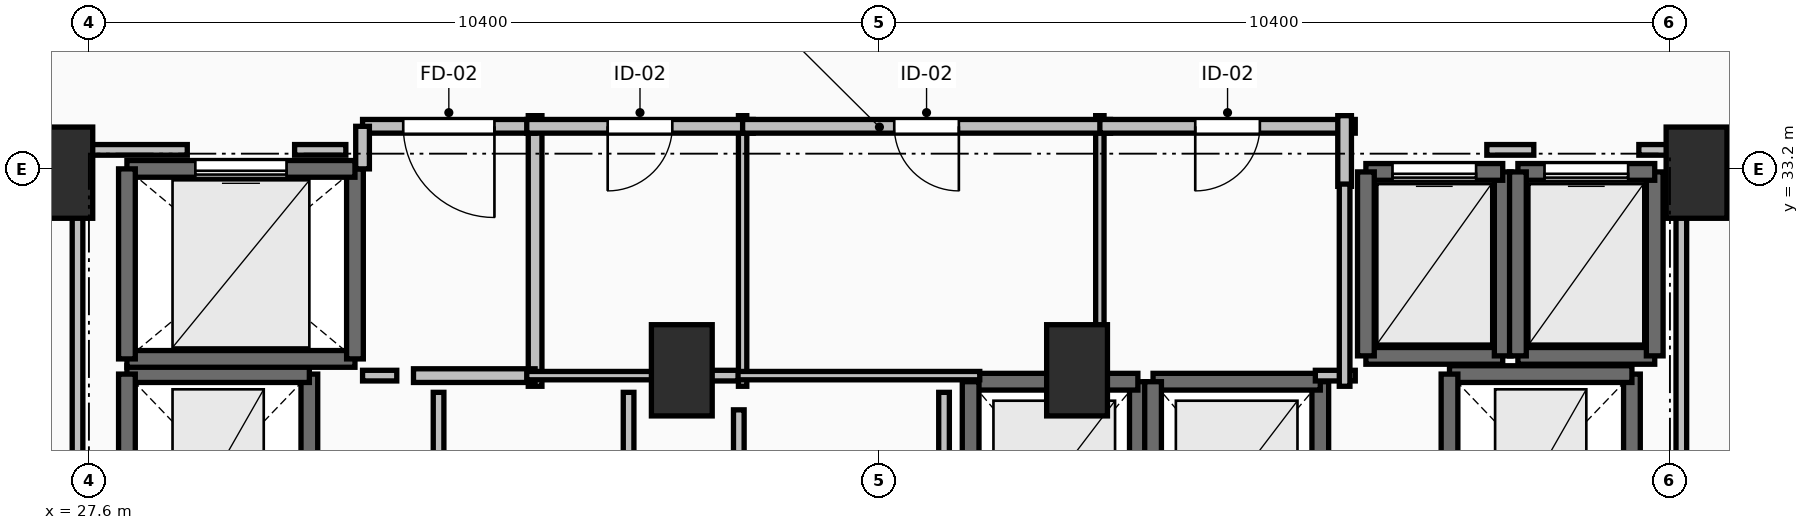
"""IFC4 building model, lengths in metres.
Left out: names, types, materials, properties, quantities, classifications, styles, units other than length and angle.
Written with IfcOpenShell. Run it as: python <this file> out.ifc"""

import sys

from ifc_helpers import new_model, si_unit, direction, frame, frame_2d, origin, origin_2d, place, context, subcontext, project, spatial, rectangle, extrude, element, fill, save


model = new_model("IFC4")
c1 = context("Model", 3, precision=1e-05, world=origin(), true_north=direction((0.0, 1.0)))
c2 = subcontext(c1, "Body", "Model", "MODEL_VIEW")
j1 = project(units=[si_unit("LENGTHUNIT", "METRE"), si_unit("PLANEANGLEUNIT", "RADIAN")], contexts=[c1])
p1 = place(None, origin())
s1 = spatial("IfcSite", under=j1, at=p1, CompositionType="ELEMENT")
p2 = place(p1, origin())
s2 = spatial("IfcBuilding", under=s1, at=p2, CompositionType="ELEMENT")
p3 = place(p2, frame((0.0, 0.0, 174.6)))
s3 = spatial("IfcBuildingStorey", under=s2, at=p3, CompositionType="ELEMENT", Elevation=174.6)
for number, where, z_axis, x_axis in (
    (1, (27.25, 33.15, 0.0), (0.0, 0.0, 1.0), (1.0, 0.0, 0.0)),
    (2, (48.75, 33.15, 0.0), (0.0, 0.0, 1.0), (1.0, 0.0, 0.0)),
    (3, (35.4, 30.55, 0.0), (0.0, 0.0, 1.0), (1.0, 0.0, 0.0)),
    (4, (40.6, 30.55, 0.0), (0.0, 0.0, 1.0), (1.0, 0.0, 0.0)),
):
    element("IfcColumn", number, at=place(p3, frame(where, z_axis=z_axis, x_axis=x_axis)), inside=s3, PredefinedType="PILASTER", context=c2, shape_type="SweptSolid", body=[
        extrude(rectangle(XDim=0.8, YDim=1.2, at=origin_2d()), origin(), (0.0, 0.0, 1.0), 4.5),
    ])
p4 = place(p3, frame((41.4, 27.8, 0.0), z_axis=(0.0, 0.0, 1.0), x_axis=(0.0, 1.0, 0.0)))
e5 = element("IfcWall", 5, at=p4, inside=s3, PredefinedType="SOLIDWALL", context=c2, shape_type="SweptSolid", body=[
    extrude(rectangle(XDim=2.6, YDim=0.22, at=frame_2d((1.3, 0.0))), origin(), (0.0, 0.0, 1.0), 4.24),
])
p5 = place(p3, frame((41.4, 30.4, 0.0), z_axis=(0.0, 0.0, 1.0), x_axis=(-1.0, 0.0, 0.0)))
e6 = element("IfcWall", 6, at=p5, inside=s3, PredefinedType="SOLIDWALL", context=c2, shape_type="SweptSolid", body=[
    extrude(rectangle(XDim=2.2, YDim=0.22, at=frame_2d((1.1, 0.0))), origin(), (0.0, 0.0, 1.0), 4.24),
])
for number, where, z_axis, x_axis in (
    (7, (39.2, 30.4, 0.0), (0.0, 0.0, 1.0), (0.0, -1.0, 0.0)),
    (8, (43.8, 27.8, 0.0), (0.0, 0.0, 1.0), (0.0, 1.0, 0.0)),
):
    element("IfcWall", number, at=place(p3, frame(where, z_axis=z_axis, x_axis=x_axis)), inside=s3, PredefinedType="SOLIDWALL", context=c2, shape_type="SweptSolid", body=[
        extrude(rectangle(XDim=2.6, YDim=0.22, at=frame_2d((1.3, 0.0))), origin(), (0.0, 0.0, 1.0), 4.24),
    ])
p6 = place(p3, frame((43.8, 30.4, 0.0), z_axis=(0.0, 0.0, 1.0), x_axis=(-1.0, 0.0, 0.0)))
e9 = element("IfcWall", 9, at=p6, inside=s3, PredefinedType="SOLIDWALL", context=c2, shape_type="SweptSolid", body=[
    extrude(rectangle(XDim=2.2, YDim=0.22, at=frame_2d((1.1, 0.0))), origin(), (0.0, 0.0, 1.0), 4.24),
])
p7 = place(p3, frame((41.6, 30.4, 0.0), z_axis=(0.0, 0.0, 1.0), x_axis=(0.0, -1.0, 0.0)))
e10 = element("IfcWall", 10, at=p7, inside=s3, PredefinedType="SOLIDWALL", context=c2, shape_type="SweptSolid", body=[
    extrude(rectangle(XDim=2.6, YDim=0.22, at=frame_2d((1.3, 0.0))), origin(), (0.0, 0.0, 1.0), 4.24),
])
p8 = place(p3, frame((44.4, 30.74, 0.0), z_axis=(0.0, 0.0, 1.0), x_axis=(1.0, 0.0, 0.0)))
e11 = element("IfcWall", 11, at=p8, inside=s3, PredefinedType="SOLIDWALL", context=c2, shape_type="SweptSolid", body=[
    extrude(rectangle(XDim=1.8, YDim=0.22, at=frame_2d((0.9, 0.0))), origin(), (0.0, 0.0, 1.0), 4.24),
])
p9 = place(p3, frame((46.2, 30.74, 0.0), z_axis=(0.0, 0.0, 1.0), x_axis=(0.0, 1.0, 0.0)))
e12 = element("IfcWall", 12, at=p9, inside=s3, PredefinedType="SOLIDWALL", context=c2, shape_type="SweptSolid", body=[
    extrude(rectangle(XDim=2.42, YDim=0.22, at=frame_2d((1.21, 0.0))), origin(), (0.0, 0.0, 1.0), 4.24),
])
p10 = place(p3, frame((46.2, 33.16, 0.0), z_axis=(0.0, 0.0, 1.0), x_axis=(-1.0, 0.0, 0.0)))
e13 = element("IfcWall", 13, at=p10, inside=s3, PredefinedType="SOLIDWALL", context=c2, shape_type="SweptSolid", body=[
    extrude(rectangle(XDim=1.8, YDim=0.22, at=frame_2d((0.9, 0.0))), origin(), (0.0, 0.0, 1.0), 4.24),
])
p11 = place(p10, frame((0.35, 0.0, 0.0)))
e14 = element("IfcOpeningElement", 14, at=p11, cuts=e13, PredefinedType="OPENING", context=c2, shape_type="SweptSolid", body=[
    extrude(rectangle(XDim=1.1, YDim=2.2, at=frame_2d((0.55, 1.1))), frame((0.0, 0.125, 0.0), z_axis=(0.0, -1.0, 0.0), x_axis=(1.0, 0.0, 0.0)), (0.0, 0.0, 1.0), 0.25),
])
p12 = place(p3, frame((44.4, 33.16, 0.0), z_axis=(0.0, 0.0, 1.0), x_axis=(0.0, -1.0, 0.0)))
e15 = element("IfcWall", 15, at=p12, inside=s3, PredefinedType="SOLIDWALL", context=c2, shape_type="SweptSolid", body=[
    extrude(rectangle(XDim=2.42, YDim=0.22, at=frame_2d((1.21, 0.0))), origin(), (0.0, 0.0, 1.0), 4.24),
])
p13 = place(p3, frame((46.4, 30.74, 0.0), z_axis=(0.0, 0.0, 1.0), x_axis=(1.0, 0.0, 0.0)))
e16 = element("IfcWall", 16, at=p13, inside=s3, PredefinedType="SOLIDWALL", context=c2, shape_type="SweptSolid", body=[
    extrude(rectangle(XDim=1.8, YDim=0.22, at=frame_2d((0.9, 0.0))), origin(), (0.0, 0.0, 1.0), 4.24),
])
p14 = place(p3, frame((48.2, 30.74, 0.0), z_axis=(0.0, 0.0, 1.0), x_axis=(0.0, 1.0, 0.0)))
e17 = element("IfcWall", 17, at=p14, inside=s3, PredefinedType="SOLIDWALL", context=c2, shape_type="SweptSolid", body=[
    extrude(rectangle(XDim=2.42, YDim=0.22, at=frame_2d((1.21, 0.0))), origin(), (0.0, 0.0, 1.0), 4.24),
])
p15 = place(p3, frame((48.2, 33.16, 0.0), z_axis=(0.0, 0.0, 1.0), x_axis=(-1.0, 0.0, 0.0)))
e18 = element("IfcWall", 18, at=p15, inside=s3, PredefinedType="SOLIDWALL", context=c2, shape_type="SweptSolid", body=[
    extrude(rectangle(XDim=1.8, YDim=0.22, at=frame_2d((0.9, 0.0))), origin(), (0.0, 0.0, 1.0), 4.24),
])
p16 = place(p15, frame((0.35, 0.0, 0.0)))
e19 = element("IfcOpeningElement", 19, at=p16, cuts=e18, PredefinedType="OPENING", context=c2, shape_type="SweptSolid", body=[
    extrude(rectangle(XDim=1.1, YDim=2.2, at=frame_2d((0.55, 1.1))), frame((0.0, 0.125, 0.0), z_axis=(0.0, -1.0, 0.0), x_axis=(1.0, 0.0, 0.0)), (0.0, 0.0, 1.0), 0.25),
])
p17 = place(p3, frame((46.4, 33.16, 0.0), z_axis=(0.0, 0.0, 1.0), x_axis=(0.0, -1.0, 0.0)))
e20 = element("IfcWall", 20, at=p17, inside=s3, PredefinedType="SOLIDWALL", context=c2, shape_type="SweptSolid", body=[
    extrude(rectangle(XDim=2.42, YDim=0.22, at=frame_2d((1.21, 0.0))), origin(), (0.0, 0.0, 1.0), 4.24),
])
p18 = place(p3, frame((30.5, 28.0, 0.0), z_axis=(0.0, 0.0, 1.0), x_axis=(0.0, 1.0, 0.0)))
e21 = element("IfcWall", 21, at=p18, inside=s3, PredefinedType="SHEAR", context=c2, shape_type="SweptSolid", body=[
    extrude(rectangle(XDim=2.5, YDim=0.22, at=frame_2d((1.25, 0.0))), origin(), (0.0, 0.0, 1.0), 4.24),
])
p19 = place(p3, frame((30.5, 30.5, 0.0), z_axis=(0.0, 0.0, 1.0), x_axis=(-1.0, 0.0, 0.0)))
e22 = element("IfcWall", 22, at=p19, inside=s3, PredefinedType="SHEAR", context=c2, shape_type="SweptSolid", body=[
    extrude(rectangle(XDim=2.4, YDim=0.22, at=frame_2d((1.2, 0.0))), origin(), (0.0, 0.0, 1.0), 4.24),
])
for number, where, z_axis, x_axis in (
    (23, (28.1, 30.5, 0.0), (0.0, 0.0, 1.0), (0.0, -1.0, 0.0)),
    (24, (47.9, 28.0, 0.0), (0.0, 0.0, 1.0), (0.0, 1.0, 0.0)),
):
    element("IfcWall", number, at=place(p3, frame(where, z_axis=z_axis, x_axis=x_axis)), inside=s3, PredefinedType="SHEAR", context=c2, shape_type="SweptSolid", body=[
        extrude(rectangle(XDim=2.5, YDim=0.22, at=frame_2d((1.25, 0.0))), origin(), (0.0, 0.0, 1.0), 4.24),
    ])
p20 = place(p3, frame((47.9, 30.5, 0.0), z_axis=(0.0, 0.0, 1.0), x_axis=(-1.0, 0.0, 0.0)))
e25 = element("IfcWall", 25, at=p20, inside=s3, PredefinedType="SHEAR", context=c2, shape_type="SweptSolid", body=[
    extrude(rectangle(XDim=2.4, YDim=0.22, at=frame_2d((1.2, 0.0))), origin(), (0.0, 0.0, 1.0), 4.24),
])
p21 = place(p3, frame((45.5, 30.5, 0.0), z_axis=(0.0, 0.0, 1.0), x_axis=(0.0, -1.0, 0.0)))
e26 = element("IfcWall", 26, at=p21, inside=s3, PredefinedType="SHEAR", context=c2, shape_type="SweptSolid", body=[
    extrude(rectangle(XDim=2.5, YDim=0.22, at=frame_2d((1.25, 0.0))), origin(), (0.0, 0.0, 1.0), 4.24),
])
p22 = place(p3, frame((28.1, 30.7, 0.0), z_axis=(0.0, 0.0, 1.0), x_axis=(1.0, 0.0, 0.0)))
e27 = element("IfcWall", 27, at=p22, inside=s3, PredefinedType="SOLIDWALL", context=c2, shape_type="SweptSolid", body=[
    extrude(rectangle(XDim=3.0, YDim=0.22, at=frame_2d((1.5, 0.0))), origin(), (0.0, 0.0, 1.0), 4.24),
])
p23 = place(p3, frame((31.1, 30.7, 0.0), z_axis=(0.0, 0.0, 1.0), x_axis=(0.0, 1.0, 0.0)))
e28 = element("IfcWall", 28, at=p23, inside=s3, PredefinedType="SOLIDWALL", context=c2, shape_type="SweptSolid", body=[
    extrude(rectangle(XDim=2.5, YDim=0.22, at=frame_2d((1.25, 0.0))), origin(), (0.0, 0.0, 1.0), 4.24),
])
p24 = place(p3, frame((31.1, 33.2, 0.0), z_axis=(0.0, 0.0, 1.0), x_axis=(-1.0, 0.0, 0.0)))
e29 = element("IfcWall", 29, at=p24, inside=s3, PredefinedType="SOLIDWALL", context=c2, shape_type="SweptSolid", body=[
    extrude(rectangle(XDim=3.0, YDim=0.22, at=frame_2d((1.5, 0.0))), origin(), (0.0, 0.0, 1.0), 4.24),
])
p25 = place(p24, frame((0.9, 0.0, 0.0)))
e30 = element("IfcOpeningElement", 30, at=p25, cuts=e29, PredefinedType="OPENING", context=c2, shape_type="SweptSolid", body=[
    extrude(rectangle(XDim=1.2, YDim=2.2, at=frame_2d((0.6, 1.1))), frame((0.0, 0.125, 0.0), z_axis=(0.0, -1.0, 0.0), x_axis=(1.0, 0.0, 0.0)), (0.0, 0.0, 1.0), 0.25),
])
p26 = place(p3, frame((28.1, 33.2, 0.0), z_axis=(0.0, 0.0, 1.0), x_axis=(0.0, -1.0, 0.0)))
e31 = element("IfcWall", 31, at=p26, inside=s3, PredefinedType="SOLIDWALL", context=c2, shape_type="SweptSolid", body=[
    extrude(rectangle(XDim=2.5, YDim=0.22, at=frame_2d((1.25, 0.0))), origin(), (0.0, 0.0, 1.0), 4.24),
])
p27 = place(p3, frame((33.47, 30.34, 0.0), z_axis=(0.0, 0.0, 1.0), x_axis=(0.0, 1.0, 0.0)))
e32 = element("IfcWall", 32, at=p27, inside=s3, PredefinedType="PARTITIONING", context=c2, shape_type="SweptSolid", body=[
    extrude(rectangle(XDim=3.56, YDim=0.18, at=frame_2d((1.78, 0.0))), origin(), (0.0, 0.0, 1.0), 4.24),
])
p28 = place(p3, frame((31.87, 30.48, 0.0), z_axis=(0.0, 0.0, 1.0), x_axis=(1.0, 0.0, 0.0)))
e33 = element("IfcWall", 33, at=p28, inside=s3, PredefinedType="PARTITIONING", context=c2, shape_type="SweptSolid", body=[
    extrude(rectangle(XDim=1.6, YDim=0.18, at=frame_2d((0.8, 0.0))), origin(), (0.0, 0.0, 1.0), 4.24),
])
p29 = place(p3, frame((33.47, 33.76, 0.0), z_axis=(0.0, 0.0, 1.0), x_axis=(-1.0, 0.0, 0.0)))
e34 = element("IfcWall", 34, at=p29, inside=s3, PredefinedType="PARTITIONING", context=c2, shape_type="SweptSolid", body=[
    extrude(rectangle(XDim=2.27, YDim=0.18, at=frame_2d((1.135, 0.0))), origin(), (0.0, 0.0, 1.0), 4.24),
])
p30 = place(p29, frame((0.535, 0.0, 0.0)))
e35 = element("IfcOpeningElement", 35, at=p30, cuts=e34, PredefinedType="OPENING", context=c2, shape_type="SweptSolid", body=[
    extrude(rectangle(XDim=1.2, YDim=2.15, at=frame_2d((0.6, 1.075))), frame((0.0, 0.105, 0.0), z_axis=(0.0, -1.0, 0.0), x_axis=(1.0, 0.0, 0.0)), (0.0, 0.0, 1.0), 0.21),
])
p31 = place(p3, frame((31.2, 33.76, 0.0), z_axis=(0.0, 0.0, 1.0), x_axis=(0.0, -1.0, 0.0)))
e36 = element("IfcWall", 36, at=p31, inside=s3, PredefinedType="PARTITIONING", context=c2, shape_type="SweptSolid", body=[
    extrude(rectangle(XDim=0.56, YDim=0.18, at=frame_2d((0.28, 0.0))), origin(), (0.0, 0.0, 1.0), 4.24),
])
p32 = place(p3, frame((36.2, 30.34, 0.0), z_axis=(0.0, 0.0, 1.0), x_axis=(0.0, 1.0, 0.0)))
e37 = element("IfcWall", 37, at=p32, inside=s3, PredefinedType="PARTITIONING", context=c2, shape_type="SweptSolid", body=[
    extrude(rectangle(XDim=3.56, YDim=0.11, at=frame_2d((1.78, 0.0))), origin(), (0.0, 0.0, 1.0), 3.432),
])
p33 = place(p3, frame((33.36, 30.48, 0.0), z_axis=(0.0, 0.0, 1.0), x_axis=(1.0, 0.0, 0.0)))
e38 = element("IfcWall", 38, at=p33, inside=s3, PredefinedType="PARTITIONING", context=c2, shape_type="SweptSolid", body=[
    extrude(rectangle(XDim=1.81, YDim=0.11, at=frame_2d((0.905, 0.0))), origin(), (0.0, 0.0, 1.0), 4.24),
])
p34 = place(p3, frame((36.34, 33.76, 0.0), z_axis=(0.0, 0.0, 1.0), x_axis=(-1.0, 0.0, 0.0)))
e39 = element("IfcWall", 39, at=p34, inside=s3, PredefinedType="PARTITIONING", context=c2, shape_type="SweptSolid", body=[
    extrude(rectangle(XDim=2.98, YDim=0.18, at=frame_2d((1.49, 0.0))), origin(), (0.0, 0.0, 1.0), 4.24),
])
p35 = place(p34, frame((1.065, 0.0, 0.0)))
e40 = element("IfcOpeningElement", 40, at=p35, cuts=e39, PredefinedType="OPENING", context=c2, shape_type="SweptSolid", body=[
    extrude(rectangle(XDim=0.85, YDim=2.1, at=frame_2d((0.425, 1.05))), frame((0.0, 0.105, 0.0), z_axis=(0.0, -1.0, 0.0), x_axis=(1.0, 0.0, 0.0)), (0.0, 0.0, 1.0), 0.21),
])
p36 = place(p3, frame((40.9, 30.34, 0.0), z_axis=(0.0, 0.0, 1.0), x_axis=(0.0, 1.0, 0.0)))
e41 = element("IfcWall", 41, at=p36, inside=s3, PredefinedType="PARTITIONING", context=c2, shape_type="SweptSolid", body=[
    extrude(rectangle(XDim=3.56, YDim=0.11, at=frame_2d((1.78, 0.0))), origin(), (0.0, 0.0, 1.0), 4.24),
])
p37 = place(p3, frame((36.11, 30.48, 0.0), z_axis=(0.0, 0.0, 1.0), x_axis=(1.0, 0.0, 0.0)))
e42 = element("IfcWall", 42, at=p37, inside=s3, PredefinedType="PARTITIONING", context=c2, shape_type="SweptSolid", body=[
    extrude(rectangle(XDim=3.21, YDim=0.11, at=frame_2d((1.605, 0.0))), origin(), (0.0, 0.0, 1.0), 3.432),
])
p38 = place(p3, frame((41.04, 33.76, 0.0), z_axis=(0.0, 0.0, 1.0), x_axis=(-1.0, 0.0, 0.0)))
e43 = element("IfcWall", 43, at=p38, inside=s3, PredefinedType="PARTITIONING", context=c2, shape_type="SweptSolid", body=[
    extrude(rectangle(XDim=4.84, YDim=0.18, at=frame_2d((2.42, 0.0))), origin(), (0.0, 0.0, 1.0), 4.24),
])
p39 = place(p38, frame((1.995, 0.0, 0.0)))
e44 = element("IfcOpeningElement", 44, at=p39, cuts=e43, PredefinedType="OPENING", context=c2, shape_type="SweptSolid", body=[
    extrude(rectangle(XDim=0.85, YDim=2.1, at=frame_2d((0.425, 1.05))), frame((0.0, 0.105, 0.0), z_axis=(0.0, -1.0, 0.0), x_axis=(1.0, 0.0, 0.0)), (0.0, 0.0, 1.0), 0.21),
])
p40 = place(p3, frame((44.26, 33.76, 0.0), z_axis=(0.0, 0.0, 1.0), x_axis=(-1.0, 0.0, 0.0)))
e45 = element("IfcWall", 45, at=p40, inside=s3, PredefinedType="PARTITIONING", context=c2, shape_type="SweptSolid", body=[
    extrude(rectangle(XDim=3.36, YDim=0.18, at=frame_2d((1.68, 0.0))), origin(), (0.0, 0.0, 1.0), 4.24),
])
p41 = place(p40, frame((1.255, 0.0, 0.0)))
e46 = element("IfcOpeningElement", 46, at=p41, cuts=e45, PredefinedType="OPENING", context=c2, shape_type="SweptSolid", body=[
    extrude(rectangle(XDim=0.85, YDim=2.1, at=frame_2d((0.425, 1.05))), frame((0.0, 0.105, 0.0), z_axis=(0.0, -1.0, 0.0), x_axis=(1.0, 0.0, 0.0)), (0.0, 0.0, 1.0), 0.21),
])
p42 = place(p3, frame((44.12, 32.97, 0.0), z_axis=(0.0, 0.0, 1.0), x_axis=(0.0, 1.0, 0.0)))
e47 = element("IfcWall", 47, at=p42, inside=s3, PredefinedType="PARTITIONING", context=c2, shape_type="SweptSolid", body=[
    extrude(rectangle(XDim=0.93, YDim=0.18, at=frame_2d((0.465, 0.0))), origin(), (0.0, 0.0, 1.0), 4.24),
])
p43 = place(p3, frame((31.2, 30.48, 0.0), z_axis=(0.0, 0.0, 1.0), x_axis=(1.0, 0.0, 0.0)))
e48 = element("IfcWall", 48, at=p43, inside=s3, PredefinedType="PARTITIONING", context=c2, shape_type="SweptSolid", body=[
    extrude(rectangle(XDim=0.45, YDim=0.14, at=frame_2d((0.225, 0.0))), origin(), (0.0, 0.0, 1.0), 4.24),
])
p44 = place(p3, frame((35.14, 30.48, 0.0), z_axis=(0.0, 0.0, 1.0), x_axis=(1.0, 0.0, 0.0)))
e49 = element("IfcWall", 49, at=p44, inside=s3, PredefinedType="PARTITIONING", context=c2, shape_type="SweptSolid", body=[
    extrude(rectangle(XDim=1.0, YDim=0.14, at=frame_2d((0.5, 0.0))), origin(), (0.0, 0.0, 1.0), 3.432),
])
p45 = place(p3, frame((43.735, 30.48, 0.0), z_axis=(0.0, 0.0, 1.0), x_axis=(1.0, 0.0, 0.0)))
e50 = element("IfcWall", 50, at=p45, inside=s3, PredefinedType="PARTITIONING", context=c2, shape_type="SweptSolid", body=[
    extrude(rectangle(XDim=0.525, YDim=0.14, at=frame_2d((0.262, 0.0))), origin(), (0.0, 0.0, 1.0), 4.24),
])
p46 = place(p3, frame((44.12, 30.34, 0.0), z_axis=(0.0, 0.0, 1.0), x_axis=(0.0, 1.0, 0.0)))
e51 = element("IfcWall", 51, at=p46, inside=s3, PredefinedType="PARTITIONING", context=c2, shape_type="SweptSolid", body=[
    extrude(rectangle(XDim=2.66, YDim=0.14, at=frame_2d((1.33, 0.0))), origin(), (0.0, 0.0, 1.0), 4.24),
])
for number, where, z_axis, x_axis in (
    (52, (32.2, 30.26, 0.0), (0.0, 0.0, 1.0), (0.0, -1.0, 0.0)),
    (53, (34.7, 27.87, 0.0), (0.0, 0.0, 1.0), (0.0, 1.0, 0.0)),
):
    element("IfcWall", number, at=place(p3, frame(where, z_axis=z_axis, x_axis=x_axis)), inside=s3, PredefinedType="PARTITIONING", context=c2, shape_type="SweptSolid", body=[
        extrude(rectangle(XDim=2.39, YDim=0.14, at=frame_2d((1.195, 0.0))), origin(), (0.0, 0.0, 1.0), 4.24),
    ])
p47 = place(p3, frame((36.15, 30.03, 0.0), z_axis=(0.0, 0.0, 1.0), x_axis=(0.0, -1.0, 0.0)))
e54 = element("IfcWall", 54, at=p47, inside=s3, PredefinedType="PARTITIONING", context=c2, shape_type="SweptSolid", body=[
    extrude(rectangle(XDim=2.16, YDim=0.14, at=frame_2d((1.08, 0.0))), origin(), (0.0, 0.0, 1.0), 4.24),
])
p48 = place(p3, frame((38.85, 27.87, 0.0), z_axis=(0.0, 0.0, 1.0), x_axis=(0.0, 1.0, 0.0)))
e55 = element("IfcWall", 55, at=p48, inside=s3, PredefinedType="PARTITIONING", context=c2, shape_type="SweptSolid", body=[
    extrude(rectangle(XDim=2.39, YDim=0.14, at=frame_2d((1.195, 0.0))), origin(), (0.0, 0.0, 1.0), 4.24),
])
p49 = place(p3, frame((48.55, 28.196, 0.0), z_axis=(0.0, 0.0, 1.0), x_axis=(0.0, 1.0, 0.0)))
e56 = element("IfcWall", 56, at=p49, inside=s3, PredefinedType="PARTITIONING", context=c2, shape_type="SweptSolid", body=[
    extrude(rectangle(XDim=5.254, YDim=0.14, at=frame_2d((2.627, 0.0))), origin(), (0.0, 0.0, 1.0), 3.432),
])
p50 = place(p3, frame((48.55, 33.45, 0.0), z_axis=(0.0, 0.0, 1.0), x_axis=(-1.0, 0.0, 0.0)))
e57 = element("IfcWall", 57, at=p50, inside=s3, PredefinedType="PARTITIONING", context=c2, shape_type="SweptSolid", body=[
    extrude(rectangle(XDim=0.559, YDim=0.14, at=frame_2d((0.28, 0.0))), origin(), (0.0, 0.0, 1.0), 3.432),
])
p51 = place(p3, frame((46.609, 33.45, 0.0), z_axis=(0.0, 0.0, 1.0), x_axis=(-1.0, 0.0, 0.0)))
e58 = element("IfcWall", 58, at=p51, inside=s3, PredefinedType="PARTITIONING", context=c2, shape_type="SweptSolid", body=[
    extrude(rectangle(XDim=0.618, YDim=0.14, at=frame_2d((0.309, 0.0))), origin(), (0.0, 0.0, 1.0), 4.24),
])
p52 = place(p3, frame((30.98, 33.45, 0.0), z_axis=(0.0, 0.0, 1.0), x_axis=(-1.0, 0.0, 0.0)))
e59 = element("IfcWall", 59, at=p52, inside=s3, PredefinedType="PARTITIONING", context=c2, shape_type="SweptSolid", body=[
    extrude(rectangle(XDim=0.674, YDim=0.14, at=frame_2d((0.337, 0.0))), origin(), (0.0, 0.0, 1.0), 4.24),
])
p53 = place(p3, frame((28.894, 33.45, 0.0), z_axis=(0.0, 0.0, 1.0), x_axis=(-1.0, 0.0, 0.0)))
e60 = element("IfcWall", 60, at=p53, inside=s3, PredefinedType="PARTITIONING", context=c2, shape_type="SweptSolid", body=[
    extrude(rectangle(XDim=1.444, YDim=0.14, at=frame_2d((0.722, 0.0))), origin(), (0.0, 0.0, 1.0), 3.432),
])
p54 = place(p3, frame((27.45, 33.45, 0.0), z_axis=(0.0, 0.0, 1.0), x_axis=(0.0, -1.0, 0.0)))
e61 = element("IfcWall", 61, at=p54, inside=s3, PredefinedType="PARTITIONING", context=c2, shape_type="SweptSolid", body=[
    extrude(rectangle(XDim=5.254, YDim=0.14, at=frame_2d((2.627, 0.0))), origin(), (0.0, 0.0, 1.0), 3.432),
])
p55 = place(p11, origin())
e62 = element("IfcDoor", 62, at=p55, inside=s3, OperationType="SLIDING_TO_LEFT", PredefinedType="DOOR", context=c2, shape_type="SweptSolid", body=[
    extrude(rectangle(XDim=1.1, YDim=2.2, at=frame_2d((0.55, 1.1))), frame((0.0, 0.025, 0.0), z_axis=(0.0, -1.0, 0.0), x_axis=(1.0, 0.0, 0.0)), (0.0, 0.0, 1.0), 0.05),
])
fill(e14, e62)
p56 = place(p16, origin())
e63 = element("IfcDoor", 63, at=p56, inside=s3, OperationType="SLIDING_TO_LEFT", PredefinedType="DOOR", context=c2, shape_type="SweptSolid", body=[
    extrude(rectangle(XDim=1.1, YDim=2.2, at=frame_2d((0.55, 1.1))), frame((0.0, 0.025, 0.0), z_axis=(0.0, -1.0, 0.0), x_axis=(1.0, 0.0, 0.0)), (0.0, 0.0, 1.0), 0.05),
])
fill(e19, e63)
p57 = place(p25, origin())
e64 = element("IfcDoor", 64, at=p57, inside=s3, OperationType="SLIDING_TO_LEFT", PredefinedType="DOOR", context=c2, shape_type="SweptSolid", body=[
    extrude(rectangle(XDim=1.2, YDim=2.2, at=frame_2d((0.6, 1.1))), frame((0.0, 0.025, 0.0), z_axis=(0.0, -1.0, 0.0), x_axis=(1.0, 0.0, 0.0)), (0.0, 0.0, 1.0), 0.05),
])
fill(e30, e64)
p58 = place(p30, origin())
e65 = element("IfcDoor", 65, at=p58, inside=s3, OperationType="SINGLE_SWING_LEFT", PredefinedType="DOOR", context=c2, shape_type="SweptSolid", body=[
    extrude(rectangle(XDim=1.2, YDim=2.15, at=frame_2d((0.6, 1.075))), frame((0.0, 0.025, 0.0), z_axis=(0.0, -1.0, 0.0), x_axis=(1.0, 0.0, 0.0)), (0.0, 0.0, 1.0), 0.05),
])
fill(e35, e65)
p59 = place(p35, origin())
e66 = element("IfcDoor", 66, at=p59, inside=s3, OperationType="SINGLE_SWING_RIGHT", PredefinedType="DOOR", context=c2, shape_type="SweptSolid", body=[
    extrude(rectangle(XDim=0.85, YDim=2.1, at=frame_2d((0.425, 1.05))), frame((0.0, 0.025, 0.0), z_axis=(0.0, -1.0, 0.0), x_axis=(1.0, 0.0, 0.0)), (0.0, 0.0, 1.0), 0.05),
])
fill(e40, e66)
p60 = place(p39, origin())
e67 = element("IfcDoor", 67, at=p60, inside=s3, OperationType="SINGLE_SWING_LEFT", PredefinedType="DOOR", context=c2, shape_type="SweptSolid", body=[
    extrude(rectangle(XDim=0.85, YDim=2.1, at=frame_2d((0.425, 1.05))), frame((0.0, 0.025, 0.0), z_axis=(0.0, -1.0, 0.0), x_axis=(1.0, 0.0, 0.0)), (0.0, 0.0, 1.0), 0.05),
])
fill(e44, e67)
p61 = place(p41, origin())
e68 = element("IfcDoor", 68, at=p61, inside=s3, OperationType="SINGLE_SWING_RIGHT", PredefinedType="DOOR", context=c2, shape_type="SweptSolid", body=[
    extrude(rectangle(XDim=0.85, YDim=2.1, at=frame_2d((0.425, 1.05))), frame((0.0, 0.025, 0.0), z_axis=(0.0, -1.0, 0.0), x_axis=(1.0, 0.0, 0.0)), (0.0, 0.0, 1.0), 0.05),
])
fill(e46, e68)
save(model, sys.argv[1])
